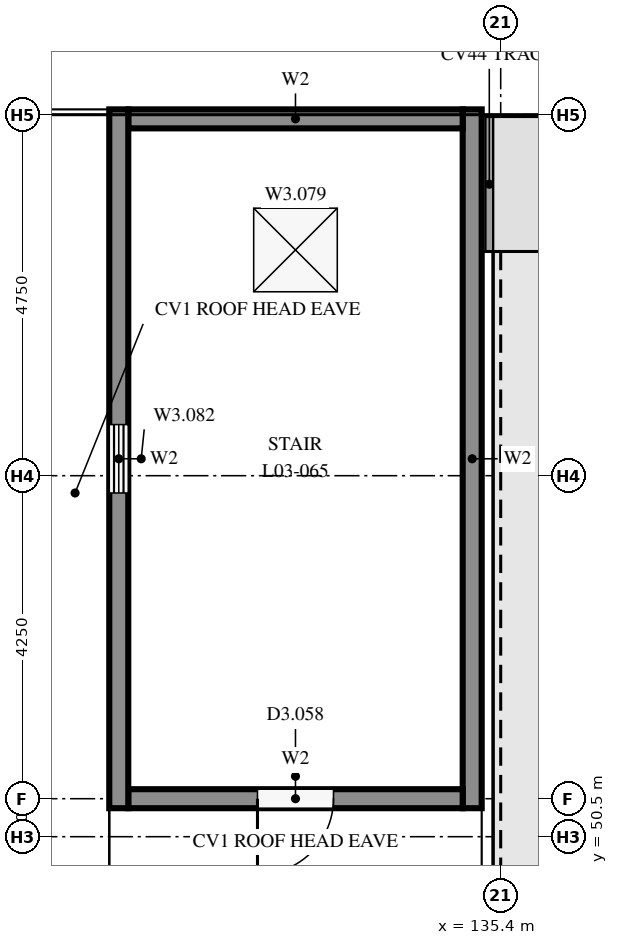
"""IFC4 building model, lengths in metres.
Left out: names, types, materials, properties, quantities, classifications, styles, units other than length and angle.
Written with IfcOpenShell. Run it as: python <this file> out.ifc"""

import sys

from ifc_helpers import new_model, si_unit, direction, frame, frame_2d, origin, origin_2d, place, context, subcontext, project, spatial, rectangle, extrude, element, fill, save


model = new_model("IFC4")
c1 = context("Model", 3, precision=1e-05, world=origin(), true_north=direction((0.0, 1.0)))
c2 = subcontext(c1, "Body", "Model", "MODEL_VIEW")
j1 = project(units=[si_unit("LENGTHUNIT", "METRE"), si_unit("PLANEANGLEUNIT", "RADIAN")], contexts=[c1])
p1 = place(None, origin())
s1 = spatial("IfcSite", under=j1, at=p1, CompositionType="ELEMENT")
p2 = place(p1, origin())
s2 = spatial("IfcBuilding", under=s1, at=p2, CompositionType="ELEMENT")
p3 = place(p2, frame((0.0, 0.0, 11.7)))
s3 = spatial("IfcBuildingStorey", under=s2, at=p3, CompositionType="ELEMENT", Elevation=11.7)
p4 = place(p3, frame((130.375, 50.875, 0.0), z_axis=(0.0, 0.0, 1.0), x_axis=(0.0, 1.0, 0.0)))
e1 = element("IfcWall", 1, at=p4, inside=s3, PredefinedType="SOLIDWALL", context=c2, shape_type="SweptSolid", body=[
    extrude(rectangle(XDim=9.195, YDim=0.25, at=frame_2d((4.598, 0.0))), origin(), (0.0, 0.0, 1.0), 2.45),
])
p5 = place(p4, frame((4.147, 0.0, 0.9)))
e2 = element("IfcOpeningElement", 2, at=p5, cuts=e1, PredefinedType="OPENING", context=c2, shape_type="SweptSolid", body=[
    extrude(rectangle(XDim=0.9, YDim=1.2, at=frame_2d((0.45, 0.6))), frame((0.0, 0.135, 0.0), z_axis=(0.0, -1.0, 0.0), x_axis=(1.0, 0.0, 0.0)), (0.0, 0.0, 1.0), 0.27),
])
p6 = place(p3, frame((135.025, 50.875, 0.0), z_axis=(0.0, 0.0, 1.0), x_axis=(0.0, 1.0, 0.0)))
e3 = element("IfcWall", 3, at=p6, inside=s3, PredefinedType="SOLIDWALL", context=c2, shape_type="SweptSolid", body=[
    extrude(rectangle(XDim=9.195, YDim=0.25, at=frame_2d((4.598, 0.0))), origin(), (0.0, 0.0, 1.0), 2.45),
])
p7 = place(p3, frame((134.9, 51.0, 0.0), z_axis=(0.0, 0.0, 1.0), x_axis=(-1.0, 0.0, 0.0)))
e4 = element("IfcWall", 4, at=p7, inside=s3, PredefinedType="SOLIDWALL", context=c2, shape_type="SweptSolid", body=[
    extrude(rectangle(XDim=4.4, YDim=0.25, at=frame_2d((2.2, 0.0))), origin(), (0.0, 0.0, 1.0), 2.45),
])
p8 = place(p7, frame((1.7, 0.0, 0.0)))
e5 = element("IfcOpeningElement", 5, at=p8, cuts=e4, PredefinedType="OPENING", context=c2, shape_type="SweptSolid", body=[
    extrude(rectangle(XDim=1.0, YDim=2.1, at=frame_2d((0.5, 1.05))), frame((0.0, 0.135, 0.0), z_axis=(0.0, -1.0, 0.0), x_axis=(1.0, 0.0, 0.0)), (0.0, 0.0, 1.0), 0.27),
])
p9 = place(p3, frame((130.5, 59.945, 0.0), z_axis=(0.0, 0.0, 1.0), x_axis=(1.0, 0.0, 0.0)))
e6 = element("IfcWall", 6, at=p9, inside=s3, PredefinedType="SOLIDWALL", context=c2, shape_type="SweptSolid", body=[
    extrude(rectangle(XDim=4.4, YDim=0.25, at=frame_2d((2.2, 0.0))), origin(), (0.0, 0.0, 1.0), 2.45),
])
p10 = place(p3, frame((0.0, 0.0, 2.45)))
p11 = place(p10, frame((132.7, 58.22, 0.0)))
p12 = place(p11, frame((0.0, 0.0, 0.15)))
e7 = element("IfcWindow", 7, at=p12, inside=s3, PartitioningType="SINGLE_PANEL", PredefinedType="SKYLIGHT", context=c2, shape_type="SweptSolid", body=[
    extrude(rectangle(XDim=1.1, YDim=1.1, at=origin_2d()), origin(), (0.0, 0.0, 1.0), 0.05),
])
p13 = place(p8, origin())
e8 = element("IfcDoor", 8, at=p13, inside=s3, OperationType="SINGLE_SWING_RIGHT", PredefinedType="DOOR", context=c2, shape_type="SweptSolid", body=[
    extrude(rectangle(XDim=1.0, YDim=2.1, at=frame_2d((0.5, 1.05))), frame((0.0, 0.025, 0.0), z_axis=(0.0, -1.0, 0.0), x_axis=(1.0, 0.0, 0.0)), (0.0, 0.0, 1.0), 0.05),
])
fill(e5, e8)
p14 = place(p5, origin())
e9 = element("IfcWindow", 9, at=p14, inside=s3, PartitioningType="SINGLE_PANEL", PredefinedType="WINDOW", context=c2, shape_type="SweptSolid", body=[
    extrude(rectangle(XDim=0.9, YDim=1.2, at=frame_2d((0.45, 0.6))), frame((0.0, 0.03, 0.0), z_axis=(0.0, -1.0, 0.0), x_axis=(1.0, 0.0, 0.0)), (0.0, 0.0, 1.0), 0.06),
])
fill(e2, e9)
save(model, sys.argv[1])
